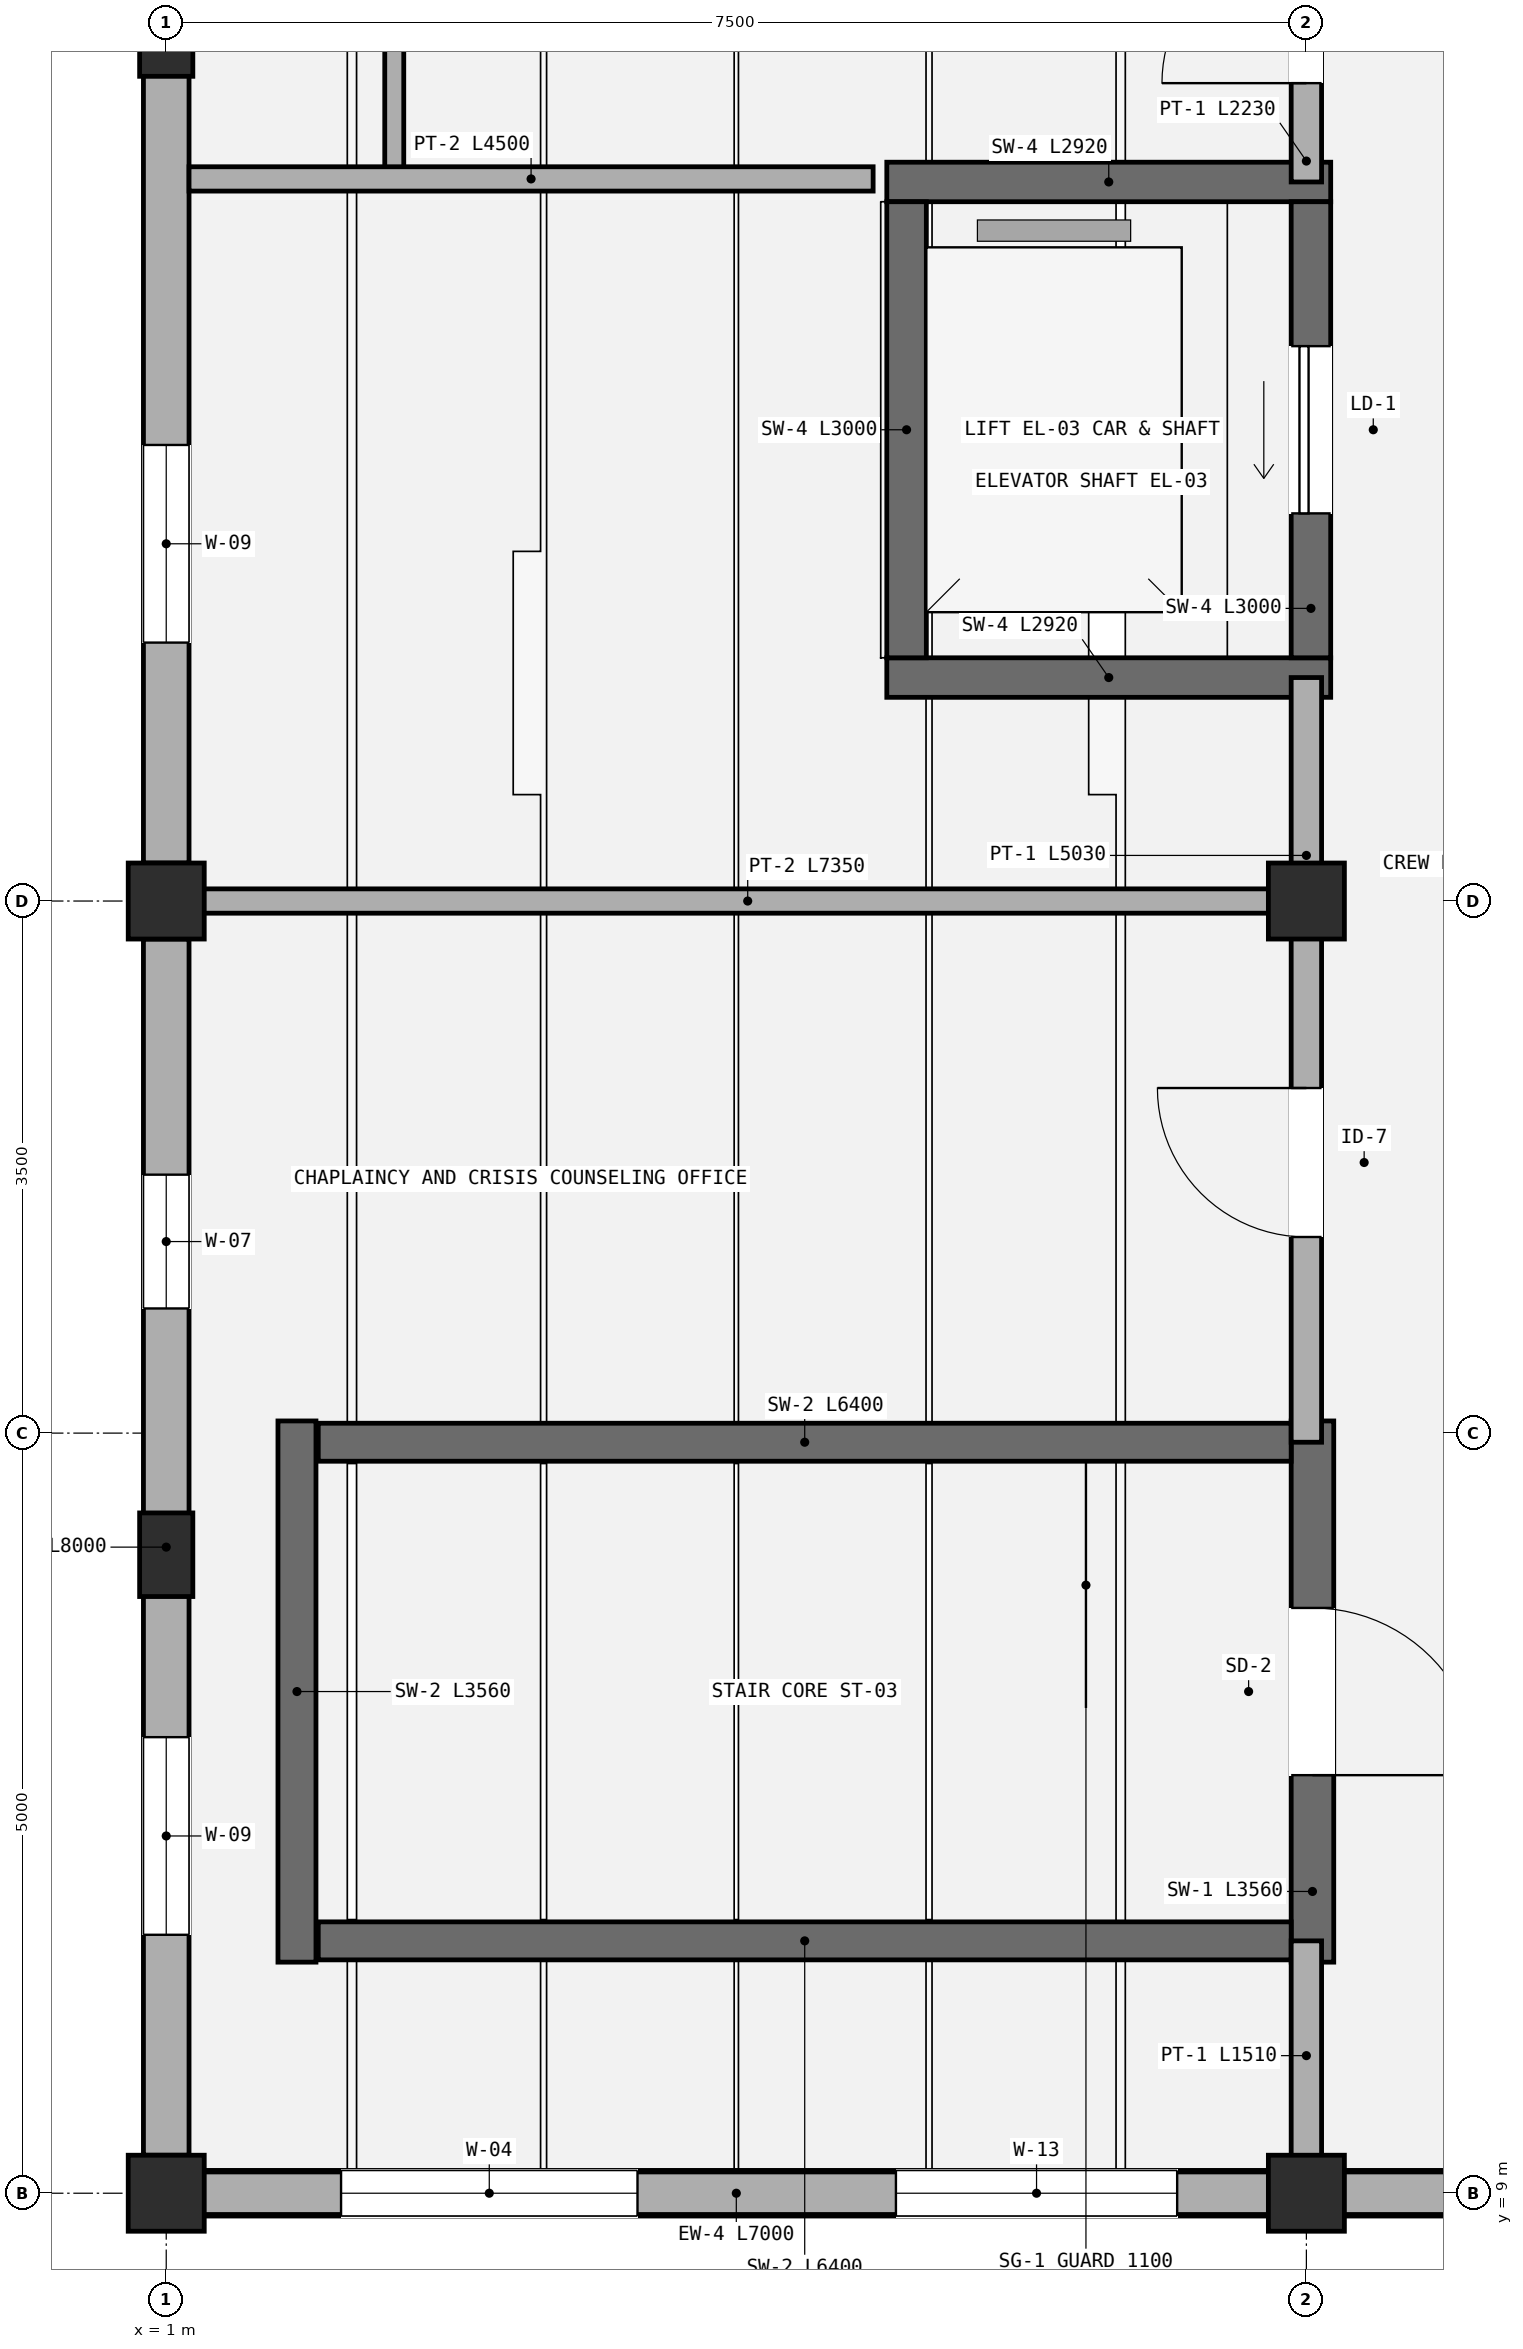
"""IFC4 building model, lengths in metres.
Left out: names, types, materials, properties, quantities, classifications, styles, units other than length and angle.
Written with IfcOpenShell. Run it as: python <this file> out.ifc"""

import sys

from ifc_helpers import new_model, si_unit, direction, frame, frame_2d, origin, origin_2d, place, context, subcontext, project, spatial, polyline, rectangle, outline, extrude, element, fill, save


model = new_model("IFC4")
c1 = context("Model", 3, precision=1e-05, world=origin(), true_north=direction((0.0, 1.0)))
c2 = subcontext(c1, "Body", "Model", "MODEL_VIEW")
j1 = project(units=[si_unit("LENGTHUNIT", "METRE"), si_unit("PLANEANGLEUNIT", "RADIAN")], contexts=[c1])
p1 = place(None, origin())
s1 = spatial("IfcSite", under=j1, at=p1, CompositionType="ELEMENT")
p2 = place(p1, origin())
s2 = spatial("IfcBuilding", under=s1, at=p2, CompositionType="ELEMENT")
p3 = place(p2, frame((0.0, 0.0, 12.75)))
s3 = spatial("IfcBuildingStorey", under=s2, at=p3, CompositionType="ELEMENT", Elevation=12.75)
for number, where, z_axis, x_axis in (
    (1, (1.0, 9.0, 0.0), (0.0, 0.0, 1.0), (1.0, 0.0, 0.0)),
    (2, (1.0, 17.5, 0.0), (0.0, 0.0, 1.0), (1.0, 0.0, 0.0)),
    (3, (8.5, 9.0, 0.0), (0.0, 0.0, 1.0), (1.0, 0.0, 0.0)),
    (4, (8.5, 17.5, 0.0), (0.0, 0.0, 1.0), (1.0, 0.0, 0.0)),
):
    element("IfcColumn", number, at=place(p3, frame(where, z_axis=z_axis, x_axis=x_axis)), inside=s3, PredefinedType="COLUMN", context=c2, shape_type="SweptSolid", body=[
        extrude(rectangle(XDim=0.5, YDim=0.5, at=origin_2d()), origin(), (0.0, 0.0, 1.0), 2.9),
    ])
for number, where, z_axis, x_axis in (
    (5, (1.0, 13.2, 0.0), (0.0, 0.0, 1.0), (1.0, 0.0, 0.0)),
    (6, (1.0, 23.2, 0.0), (0.0, 0.0, 1.0), (1.0, 0.0, 0.0)),
):
    element("IfcColumn", number, at=place(p3, frame(where, z_axis=z_axis, x_axis=x_axis)), inside=s3, PredefinedType="PILASTER", context=c2, shape_type="SweptSolid", body=[
        extrude(rectangle(XDim=0.35, YDim=0.55, at=origin_2d()), origin(), (0.0, 0.0, 1.0), 2.9),
    ])
p4 = place(p3, frame((1.25, 9.0, 0.0), z_axis=(0.0, 0.0, 1.0), x_axis=(1.0, 0.0, 0.0)))
e7 = element("IfcWall", 7, at=p4, inside=s3, PredefinedType="STANDARD", context=c2, shape_type="SweptSolid", body=[
    extrude(rectangle(XDim=7.0, YDim=0.3, at=frame_2d((3.5, 0.0))), origin(), (0.0, 0.0, 1.0), 2.25),
])
p5 = place(p4, frame((0.9, 0.0, 0.66)))
e8 = element("IfcOpeningElement", 8, at=p5, cuts=e7, PredefinedType="OPENING", context=c2, shape_type="SweptSolid", body=[
    extrude(rectangle(XDim=1.95, YDim=1.35, at=frame_2d((0.975, 0.675))), frame((0.0, 0.16, 0.0), z_axis=(0.0, -1.0, 0.0), x_axis=(1.0, 0.0, 0.0)), (0.0, 0.0, 1.0), 0.32),
])
p6 = place(p4, frame((4.55, 0.0, 0.71)))
e9 = element("IfcOpeningElement", 9, at=p6, cuts=e7, PredefinedType="OPENING", context=c2, shape_type="SweptSolid", body=[
    extrude(rectangle(XDim=1.85, YDim=1.3, at=frame_2d((0.925, 0.65))), frame((0.0, 0.16, 0.0), z_axis=(0.0, -1.0, 0.0), x_axis=(1.0, 0.0, 0.0)), (0.0, 0.0, 1.0), 0.32),
])
p7 = place(p3, frame((8.75, 9.0, 0.0), z_axis=(0.0, 0.0, 1.0), x_axis=(1.0, 0.0, 0.0)))
e10 = element("IfcWall", 10, at=p7, inside=s3, PredefinedType="STANDARD", context=c2, shape_type="SweptSolid", body=[
    extrude(rectangle(XDim=3.5, YDim=0.3, at=frame_2d((1.75, 0.0))), origin(), (0.0, 0.0, 1.0), 2.25),
])
p8 = place(p7, frame((0.9, 0.0, 0.66)))
e11 = element("IfcOpeningElement", 11, at=p8, cuts=e10, PredefinedType="OPENING", context=c2, shape_type="SweptSolid", body=[
    extrude(rectangle(XDim=1.95, YDim=1.35, at=frame_2d((0.975, 0.675))), frame((0.0, 0.16, 0.0), z_axis=(0.0, -1.0, 0.0), x_axis=(1.0, 0.0, 0.0)), (0.0, 0.0, 1.0), 0.32),
])
p9 = place(p3, frame((1.0, 9.0, 2.9), z_axis=(0.0, 0.0, 1.0), x_axis=(1.0, 0.0, 0.0)))
e12 = element("IfcWall", 12, at=p9, inside=s3, PredefinedType="PARAPET", context=c2, shape_type="SweptSolid", body=[
    extrude(outline(polyline([(0.0, 0.0), (7.5, 0.0), (7.5, 0.8), (6.668, 0.8), (6.667, 0.888), (5.834, 0.888), (5.833, 0.975), (5.001, 0.975), (5.0, 1.062), (4.168, 1.062), (4.167, 1.15), (3.334, 1.15), (3.333, 1.062), (2.501, 1.062), (2.5, 0.975), (1.668, 0.975), (1.667, 0.888), (0.834, 0.888), (0.833, 0.8), (0.0, 0.8), (0.0, 0.0)])), frame((0.0, 0.14, 0.0), z_axis=(0.0, -1.0, 0.0), x_axis=(1.0, 0.0, 0.0)), (0.0, 0.0, 1.0), 0.28),
])
p10 = place(p3, frame((8.5, 9.0, 2.9), z_axis=(0.0, 0.0, 1.0), x_axis=(1.0, 0.0, 0.0)))
e13 = element("IfcWall", 13, at=p10, inside=s3, PredefinedType="PARAPET", context=c2, shape_type="SweptSolid", body=[
    extrude(outline(polyline([(0.0, 0.0), (4.0, 0.0), (4.0, 0.8), (3.557, 0.8), (3.556, 0.888), (3.112, 0.888), (3.111, 0.975), (2.668, 0.975), (2.667, 1.062), (2.223, 1.062), (2.222, 1.15), (1.779, 1.15), (1.778, 1.062), (1.334, 1.062), (1.333, 0.975), (0.89, 0.975), (0.889, 0.888), (0.445, 0.888), (0.444, 0.8), (0.0, 0.8), (0.0, 0.0)])), frame((0.0, 0.14, 0.0), z_axis=(0.0, -1.0, 0.0), x_axis=(1.0, 0.0, 0.0)), (0.0, 0.0, 1.0), 0.28),
])
p11 = place(p3, frame((1.0, 17.25, 0.0), z_axis=(0.0, 0.0, 1.0), x_axis=(0.0, -1.0, 0.0)))
e14 = element("IfcWall", 14, at=p11, inside=s3, PredefinedType="STANDARD", context=c2, shape_type="SweptSolid", body=[
    extrude(rectangle(XDim=8.0, YDim=0.3, at=frame_2d((4.0, 0.0))), origin(), (0.0, 0.0, 1.0), 2.25),
])
p12 = place(p11, frame((1.55, 0.0, 0.51)))
e15 = element("IfcOpeningElement", 15, at=p12, cuts=e14, PredefinedType="OPENING", context=c2, shape_type="SweptSolid", body=[
    extrude(rectangle(XDim=0.88, YDim=1.5, at=frame_2d((0.44, 0.75))), frame((0.0, 0.16, 0.0), z_axis=(0.0, -1.0, 0.0), x_axis=(1.0, 0.0, 0.0)), (0.0, 0.0, 1.0), 0.32),
])
p13 = place(p11, frame((5.25, 0.0, 0.61)))
e16 = element("IfcOpeningElement", 16, at=p13, cuts=e14, PredefinedType="OPENING", context=c2, shape_type="SweptSolid", body=[
    extrude(rectangle(XDim=1.3, YDim=1.4, at=frame_2d((0.65, 0.7))), frame((0.0, 0.16, 0.0), z_axis=(0.0, -1.0, 0.0), x_axis=(1.0, 0.0, 0.0)), (0.0, 0.0, 1.0), 0.32),
])
p14 = place(p3, frame((1.0, 28.75, 0.0), z_axis=(0.0, 0.0, 1.0), x_axis=(0.0, -1.0, 0.0)))
e17 = element("IfcWall", 17, at=p14, inside=s3, PredefinedType="STANDARD", context=c2, shape_type="SweptSolid", body=[
    extrude(rectangle(XDim=11.0, YDim=0.3, at=frame_2d((5.5, 0.0))), origin(), (0.0, 0.0, 1.0), 2.25),
])
p15 = place(p14, frame((1.55, 0.0, 0.51)))
e18 = element("IfcOpeningElement", 18, at=p15, cuts=e17, PredefinedType="OPENING", context=c2, shape_type="SweptSolid", body=[
    extrude(rectangle(XDim=0.88, YDim=1.5, at=frame_2d((0.44, 0.75))), frame((0.0, 0.16, 0.0), z_axis=(0.0, -1.0, 0.0), x_axis=(1.0, 0.0, 0.0)), (0.0, 0.0, 1.0), 0.32),
])
p16 = place(p14, frame((8.25, 0.0, 0.61)))
e19 = element("IfcOpeningElement", 19, at=p16, cuts=e17, PredefinedType="OPENING", context=c2, shape_type="SweptSolid", body=[
    extrude(rectangle(XDim=1.3, YDim=1.4, at=frame_2d((0.65, 0.7))), frame((0.0, 0.16, 0.0), z_axis=(0.0, -1.0, 0.0), x_axis=(1.0, 0.0, 0.0)), (0.0, 0.0, 1.0), 0.32),
])
p17 = place(p3, frame((8.54, 14.08, 0.0), z_axis=(0.0, 0.0, 1.0), x_axis=(0.0, -1.0, 0.0)))
e20 = element("IfcWall", 20, at=p17, inside=s3, PredefinedType="SHEAR", context=c2, shape_type="SweptSolid", body=[
    extrude(rectangle(XDim=3.56, YDim=0.28, at=frame_2d((1.78, 0.0))), origin(), (0.0, 0.0, 1.0), 2.8),
])
p18 = place(p17, frame((1.23, 0.0, 0.0)))
e21 = element("IfcOpeningElement", 21, at=p18, cuts=e20, PredefinedType="OPENING", context=c2, shape_type="SweptSolid", body=[
    extrude(rectangle(XDim=1.1, YDim=2.15, at=frame_2d((0.55, 1.075))), frame((0.0, 0.15, 0.0), z_axis=(0.0, -1.0, 0.0), x_axis=(1.0, 0.0, 0.0)), (0.0, 0.0, 1.0), 0.3),
])
p19 = place(p3, frame((1.86, 10.52, 0.0), z_axis=(0.0, 0.0, 1.0), x_axis=(0.0, 1.0, 0.0)))
e22 = element("IfcWall", 22, at=p19, inside=s3, PredefinedType="SHEAR", context=c2, shape_type="SweptSolid", body=[
    extrude(rectangle(XDim=3.56, YDim=0.25, at=frame_2d((1.78, 0.0))), origin(), (0.0, 0.0, 1.0), 2.8),
])
for number, where, z_axis, x_axis in (
    (23, (8.4, 13.94, 0.0), (0.0, 0.0, 1.0), (-1.0, 0.0, 0.0)),
    (24, (2.0, 10.66, 0.0), (0.0, 0.0, 1.0), (1.0, 0.0, 0.0)),
):
    element("IfcWall", number, at=place(p3, frame(where, z_axis=z_axis, x_axis=x_axis)), inside=s3, PredefinedType="SHEAR", context=c2, shape_type="SweptSolid", body=[
        extrude(rectangle(XDim=6.4, YDim=0.25, at=frame_2d((3.2, 0.0))), origin(), (0.0, 0.0, 1.0), 2.8),
    ])
for number, where, z_axis, x_axis in (
    (25, (5.74, 18.97, 0.0), (0.0, 0.0, 1.0), (1.0, 0.0, 0.0)),
    (26, (8.66, 22.23, 0.0), (0.0, 0.0, 1.0), (-1.0, 0.0, 0.0)),
):
    element("IfcWall", number, at=place(p3, frame(where, z_axis=z_axis, x_axis=x_axis)), inside=s3, PredefinedType="SHEAR", context=c2, shape_type="SweptSolid", body=[
        extrude(rectangle(XDim=2.92, YDim=0.26, at=frame_2d((1.46, 0.0))), origin(), (0.0, 0.0, 1.0), 2.8),
    ])
p20 = place(p3, frame((5.87, 22.1, 0.0), z_axis=(0.0, 0.0, 1.0), x_axis=(0.0, -1.0, 0.0)))
e27 = element("IfcWall", 27, at=p20, inside=s3, PredefinedType="SHEAR", context=c2, shape_type="SweptSolid", body=[
    extrude(rectangle(XDim=3.0, YDim=0.26, at=frame_2d((1.5, 0.0))), origin(), (0.0, 0.0, 1.0), 2.8),
])
p21 = place(p3, frame((8.53, 19.1, 0.0), z_axis=(0.0, 0.0, 1.0), x_axis=(0.0, 1.0, 0.0)))
e28 = element("IfcWall", 28, at=p21, inside=s3, PredefinedType="SHEAR", context=c2, shape_type="SweptSolid", body=[
    extrude(rectangle(XDim=3.0, YDim=0.26, at=frame_2d((1.5, 0.0))), origin(), (0.0, 0.0, 1.0), 2.8),
])
p22 = place(p21, frame((0.95, 0.0, 0.0)))
e29 = element("IfcOpeningElement", 29, at=p22, cuts=e28, PredefinedType="OPENING", context=c2, shape_type="SweptSolid", body=[
    extrude(rectangle(XDim=1.1, YDim=2.15, at=frame_2d((0.55, 1.075))), frame((0.0, 0.14, 0.0), z_axis=(0.0, -1.0, 0.0), x_axis=(1.0, 0.0, 0.0)), (0.0, 0.0, 1.0), 0.28),
])
p23 = place(p3, frame((8.5, 9.15, 0.0), z_axis=(0.0, 0.0, 1.0), x_axis=(0.0, 1.0, 0.0)))
e30 = element("IfcWall", 30, at=p23, inside=s3, PredefinedType="PARTITIONING", context=c2, shape_type="SweptSolid", body=[
    extrude(rectangle(XDim=1.51, YDim=0.2, at=frame_2d((0.755, 0.0))), origin(), (0.0, 0.0, 1.0), 2.15),
])
p24 = place(p3, frame((8.5, 13.94, 0.0), z_axis=(0.0, 0.0, 1.0), x_axis=(0.0, 1.0, 0.0)))
e31 = element("IfcWall", 31, at=p24, inside=s3, PredefinedType="PARTITIONING", context=c2, shape_type="SweptSolid", body=[
    extrude(rectangle(XDim=5.03, YDim=0.2, at=frame_2d((2.515, 0.0))), origin(), (0.0, 0.0, 1.0), 2.15),
])
p25 = place(p24, frame((1.35, 0.0, 0.0)))
e32 = element("IfcOpeningElement", 32, at=p25, cuts=e31, PredefinedType="OPENING", context=c2, shape_type="SweptSolid", body=[
    extrude(rectangle(XDim=0.98, YDim=2.12, at=frame_2d((0.49, 1.06))), frame((0.0, 0.11, 0.0), z_axis=(0.0, -1.0, 0.0), x_axis=(1.0, 0.0, 0.0)), (0.0, 0.0, 1.0), 0.22),
])
p26 = place(p3, frame((8.5, 22.23, 0.0), z_axis=(0.0, 0.0, 1.0), x_axis=(0.0, 1.0, 0.0)))
e33 = element("IfcWall", 33, at=p26, inside=s3, PredefinedType="PARTITIONING", context=c2, shape_type="SweptSolid", body=[
    extrude(rectangle(XDim=2.23, YDim=0.2, at=frame_2d((1.115, 0.0))), origin(), (0.0, 0.0, 1.0), 2.15),
])
p27 = place(p26, frame((0.65, 0.0, 0.0)))
e34 = element("IfcOpeningElement", 34, at=p27, cuts=e33, PredefinedType="OPENING", context=c2, shape_type="SweptSolid", body=[
    extrude(rectangle(XDim=0.95, YDim=2.1, at=frame_2d((0.475, 1.05))), frame((0.0, 0.11, 0.0), z_axis=(0.0, -1.0, 0.0), x_axis=(1.0, 0.0, 0.0)), (0.0, 0.0, 1.0), 0.22),
])
p28 = place(p3, frame((2.5, 22.25, 0.0), z_axis=(0.0, 0.0, 1.0), x_axis=(0.0, 1.0, 0.0)))
e35 = element("IfcWall", 35, at=p28, inside=s3, PredefinedType="PARTITIONING", context=c2, shape_type="SweptSolid", body=[
    extrude(rectangle(XDim=2.25, YDim=0.125, at=frame_2d((1.125, 0.0))), origin(), (0.0, 0.0, 1.0), 2.15),
])
p29 = place(p3, frame((1.15, 17.5, 0.0), z_axis=(0.0, 0.0, 1.0), x_axis=(1.0, 0.0, 0.0)))
e36 = element("IfcWall", 36, at=p29, inside=s3, PredefinedType="PARTITIONING", context=c2, shape_type="SweptSolid", body=[
    extrude(rectangle(XDim=7.35, YDim=0.16, at=frame_2d((3.675, 0.0))), origin(), (0.0, 0.0, 1.0), 2.15),
])
p30 = place(p3, frame((1.15, 22.25, 0.0), z_axis=(0.0, 0.0, 1.0), x_axis=(1.0, 0.0, 0.0)))
e37 = element("IfcWall", 37, at=p30, inside=s3, PredefinedType="PARTITIONING", context=c2, shape_type="SweptSolid", body=[
    extrude(rectangle(XDim=4.5, YDim=0.16, at=frame_2d((2.25, 0.0))), origin(), (0.0, 0.0, 1.0), 2.15),
])
p31 = place(p5, origin())
e38 = element("IfcWindow", 38, at=p31, inside=s3, PartitioningType="DOUBLE_PANEL_HORIZONTAL", PredefinedType="WINDOW", context=c2, shape_type="SweptSolid", body=[
    extrude(rectangle(XDim=1.95, YDim=1.35, at=frame_2d((0.975, 0.675))), frame((0.0, 0.03, 0.0), z_axis=(0.0, -1.0, 0.0), x_axis=(1.0, 0.0, 0.0)), (0.0, 0.0, 1.0), 0.06),
])
fill(e8, e38)
p32 = place(p6, origin())
e39 = element("IfcWindow", 39, at=p32, inside=s3, PartitioningType="DOUBLE_PANEL_HORIZONTAL", PredefinedType="WINDOW", context=c2, shape_type="SweptSolid", body=[
    extrude(rectangle(XDim=1.85, YDim=1.3, at=frame_2d((0.925, 0.65))), frame((0.0, 0.03, 0.0), z_axis=(0.0, -1.0, 0.0), x_axis=(1.0, 0.0, 0.0)), (0.0, 0.0, 1.0), 0.06),
])
fill(e9, e39)
p33 = place(p12, origin())
e40 = element("IfcWindow", 40, at=p33, inside=s3, PartitioningType="SINGLE_PANEL", PredefinedType="WINDOW", context=c2, shape_type="SweptSolid", body=[
    extrude(rectangle(XDim=0.88, YDim=1.5, at=frame_2d((0.44, 0.75))), frame((0.0, 0.03, 0.0), z_axis=(0.0, -1.0, 0.0), x_axis=(1.0, 0.0, 0.0)), (0.0, 0.0, 1.0), 0.06),
])
fill(e15, e40)
p34 = place(p13, origin())
e41 = element("IfcWindow", 41, at=p34, inside=s3, PartitioningType="SINGLE_PANEL", PredefinedType="WINDOW", context=c2, shape_type="SweptSolid", body=[
    extrude(rectangle(XDim=1.3, YDim=1.4, at=frame_2d((0.65, 0.7))), frame((0.0, 0.03, 0.0), z_axis=(0.0, -1.0, 0.0), x_axis=(1.0, 0.0, 0.0)), (0.0, 0.0, 1.0), 0.06),
])
fill(e16, e41)
p35 = place(p16, origin())
e42 = element("IfcWindow", 42, at=p35, inside=s3, PartitioningType="SINGLE_PANEL", PredefinedType="WINDOW", context=c2, shape_type="SweptSolid", body=[
    extrude(rectangle(XDim=1.3, YDim=1.4, at=frame_2d((0.65, 0.7))), frame((0.0, 0.03, 0.0), z_axis=(0.0, -1.0, 0.0), x_axis=(1.0, 0.0, 0.0)), (0.0, 0.0, 1.0), 0.06),
])
fill(e19, e42)
p36 = place(p18, origin())
e43 = element("IfcDoor", 43, at=p36, inside=s3, OperationType="SINGLE_SWING_RIGHT", PredefinedType="DOOR", context=c2, shape_type="SweptSolid", body=[
    extrude(rectangle(XDim=1.1, YDim=2.15, at=frame_2d((0.55, 1.075))), frame((0.0, 0.025, 0.0), z_axis=(0.0, -1.0, 0.0), x_axis=(1.0, 0.0, 0.0)), (0.0, 0.0, 1.0), 0.05),
])
fill(e21, e43)
p37 = place(p22, origin())
e44 = element("IfcDoor", 44, at=p37, inside=s3, OperationType="SLIDING_TO_LEFT", PredefinedType="DOOR", context=c2, shape_type="SweptSolid", body=[
    extrude(rectangle(XDim=1.1, YDim=2.15, at=frame_2d((0.55, 1.075))), frame((0.0, 0.025, 0.0), z_axis=(0.0, -1.0, 0.0), x_axis=(1.0, 0.0, 0.0)), (0.0, 0.0, 1.0), 0.05),
])
fill(e29, e44)
p38 = place(p25, origin())
e45 = element("IfcDoor", 45, at=p38, inside=s3, OperationType="SINGLE_SWING_RIGHT", PredefinedType="DOOR", context=c2, shape_type="SweptSolid", body=[
    extrude(rectangle(XDim=0.98, YDim=2.12, at=frame_2d((0.49, 1.06))), frame((0.0, 0.025, 0.0), z_axis=(0.0, -1.0, 0.0), x_axis=(1.0, 0.0, 0.0)), (0.0, 0.0, 1.0), 0.05),
])
fill(e32, e45)
p39 = place(p27, origin())
e46 = element("IfcDoor", 46, at=p39, inside=s3, OperationType="SINGLE_SWING_LEFT", PredefinedType="DOOR", context=c2, shape_type="SweptSolid", body=[
    extrude(rectangle(XDim=0.95, YDim=2.1, at=frame_2d((0.475, 1.05))), frame((0.0, 0.025, 0.0), z_axis=(0.0, -1.0, 0.0), x_axis=(1.0, 0.0, 0.0)), (0.0, 0.0, 1.0), 0.05),
])
fill(e34, e46)
save(model, sys.argv[1])
